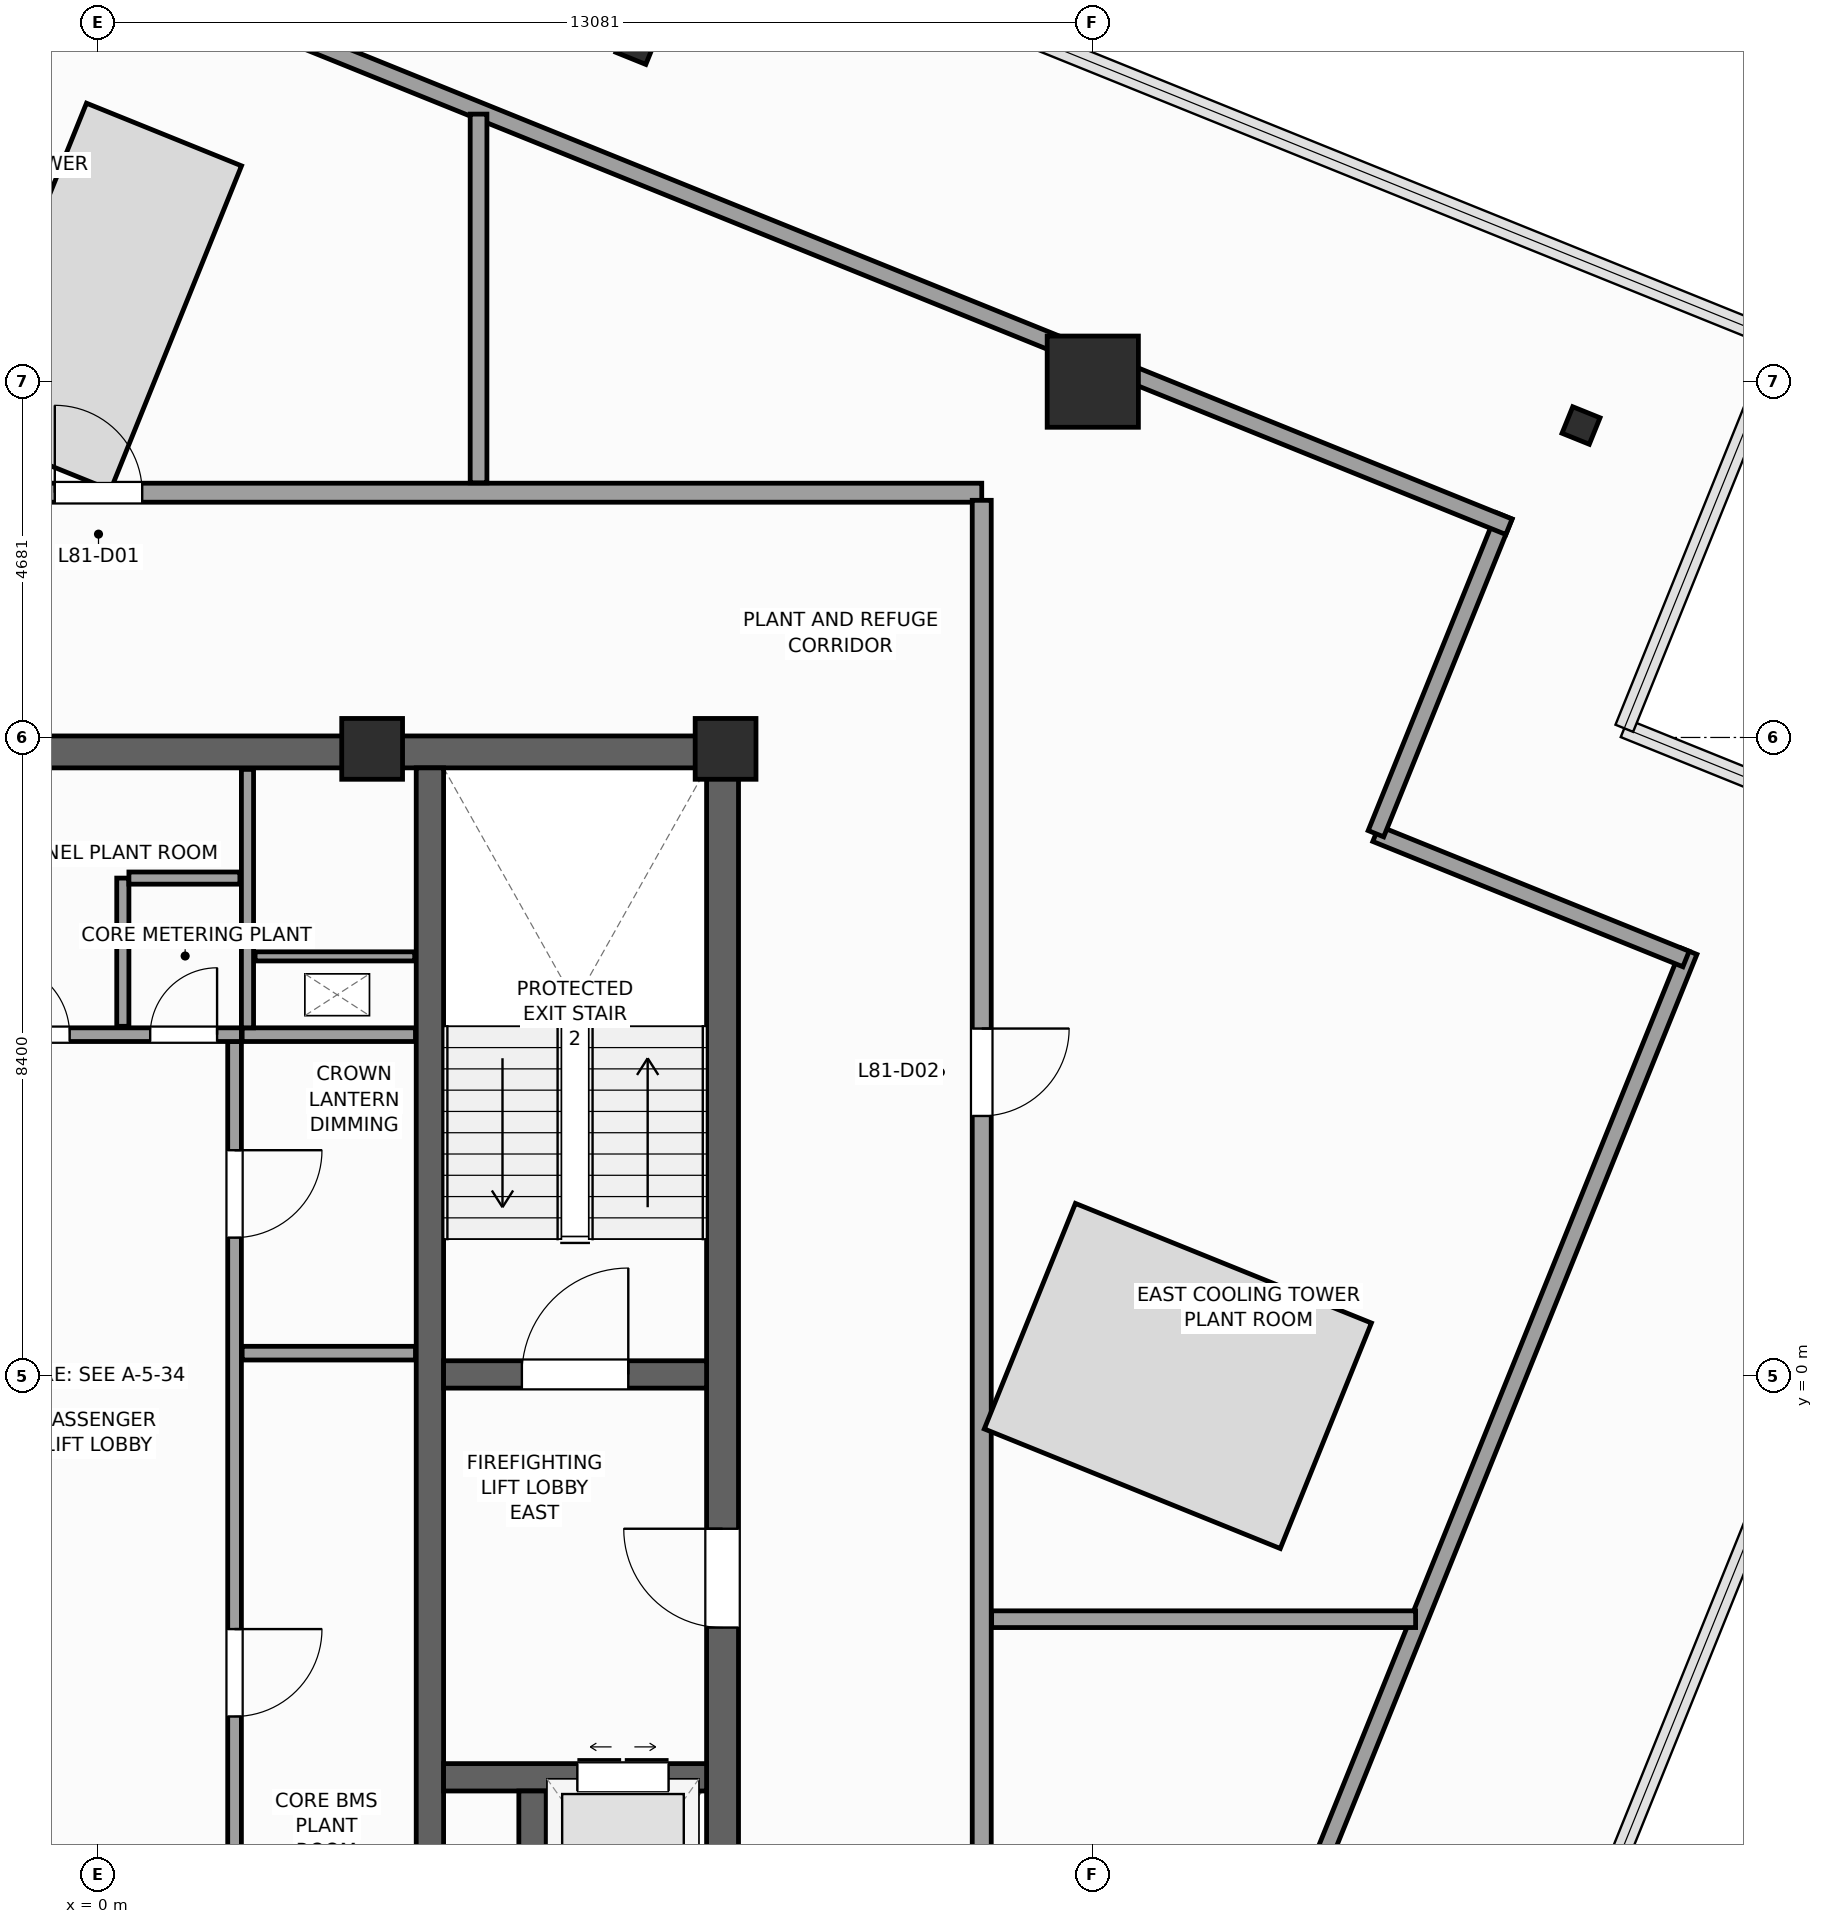
"""IFC4 building model, lengths in metres.
Left out: names, types, materials, properties, quantities, classifications, styles, units other than length and angle.
Written with IfcOpenShell. Run it as: python <this file> out.ifc"""

import sys

from ifc_helpers import new_model, si_unit, direction, frame, frame_2d, origin, origin_2d, place, context, subcontext, project, spatial, rectangle, i_section, extrude, source, transform, mapped, element, fill, save


model = new_model("IFC4")
c1 = context("Model", 3, precision=1e-05, world=origin(), true_north=direction((0.0, 1.0)))
c2 = subcontext(c1, "Body", "Model", "MODEL_VIEW")
j1 = project(units=[si_unit("LENGTHUNIT", "METRE"), si_unit("PLANEANGLEUNIT", "RADIAN")], contexts=[c1])
p1 = place(None, origin())
s1 = spatial("IfcSite", under=j1, at=p1, CompositionType="ELEMENT")
p2 = place(p1, origin())
s2 = spatial("IfcBuilding", under=s1, at=p2, CompositionType="ELEMENT")
p3 = place(p2, frame((0.0, 0.0, 329.6)))
s3 = spatial("IfcBuildingStorey", under=s2, at=p3, CompositionType="ELEMENT", Elevation=329.6)
p4 = place(p3, frame((-8.42, 8.21, 0.0), z_axis=(0.0, 0.0, 1.0), x_axis=(1.0, 0.0, 0.0)))
e1 = element("IfcWall", 1, at=p4, inside=s3, PredefinedType="SHEAR", context=c2, shape_type="SweptSolid", body=[
    extrude(rectangle(XDim=16.84, YDim=0.42, at=frame_2d((8.42, 0.0))), origin(), (0.0, 0.0, 1.0), 4.0),
])
p5 = place(p3, frame((8.21, -8.0, 0.0), z_axis=(0.0, 0.0, 1.0), x_axis=(0.0, 1.0, 0.0)))
e2 = element("IfcWall", 2, at=p5, inside=s3, PredefinedType="SHEAR", context=c2, shape_type="SweptSolid", body=[
    extrude(rectangle(XDim=16.0, YDim=0.42, at=frame_2d((8.0, 0.0))), origin(), (0.0, 0.0, 1.0), 4.0),
])
p6 = place(p5, frame((4.69, 0.0, 0.0)))
e3 = element("IfcOpeningElement", 3, at=p6, cuts=e2, PredefinedType="OPENING", context=c2, shape_type="SweptSolid", body=[
    extrude(rectangle(XDim=1.3, YDim=2.2, at=frame_2d((0.65, 1.1))), frame((0.0, 0.22, 0.0), z_axis=(0.0, -1.0, 0.0), x_axis=(1.0, 0.0, 0.0)), (0.0, 0.0, 1.0), 0.44),
])
p7 = place(p3, frame((4.36, -8.0, 0.0), z_axis=(0.0, 0.0, 1.0), x_axis=(0.0, 1.0, 0.0)))
e4 = element("IfcWall", 4, at=p7, inside=s3, PredefinedType="SHEAR", context=c2, shape_type="SweptSolid", body=[
    extrude(rectangle(XDim=16.0, YDim=0.36, at=frame_2d((8.0, 0.0))), origin(), (0.0, 0.0, 1.0), 4.0),
])
p8 = place(p3, frame((4.54, 0.02, 0.0), z_axis=(0.0, 0.0, 1.0), x_axis=(1.0, 0.0, 0.0)))
e5 = element("IfcWall", 5, at=p8, inside=s3, PredefinedType="SHEAR", context=c2, shape_type="SweptSolid", body=[
    extrude(rectangle(XDim=3.46, YDim=0.36, at=frame_2d((1.73, 0.0))), origin(), (0.0, 0.0, 1.0), 4.0),
])
p9 = place(p8, frame((1.03, 0.0, 0.0)))
e6 = element("IfcOpeningElement", 6, at=p9, cuts=e5, PredefinedType="OPENING", context=c2, shape_type="SweptSolid", body=[
    extrude(rectangle(XDim=1.4, YDim=2.2, at=frame_2d((0.7, 1.1))), frame((0.0, 0.19, 0.0), z_axis=(0.0, -1.0, 0.0), x_axis=(1.0, 0.0, 0.0)), (0.0, 0.0, 1.0), 0.38),
])
p10 = place(p3, frame((4.54, -5.28, 0.0), z_axis=(0.0, 0.0, 1.0), x_axis=(1.0, 0.0, 0.0)))
e7 = element("IfcWall", 7, at=p10, inside=s3, PredefinedType="SHEAR", context=c2, shape_type="SweptSolid", body=[
    extrude(rectangle(XDim=3.46, YDim=0.36, at=frame_2d((1.73, 0.0))), origin(), (0.0, 0.0, 1.0), 4.0),
])
p11 = place(p10, frame((1.76, 0.0, 0.0)))
e8 = element("IfcOpeningElement", 8, at=p11, cuts=e7, PredefinedType="OPENING", context=c2, shape_type="SweptSolid", body=[
    extrude(rectangle(XDim=1.2, YDim=2.25, at=frame_2d((0.6, 1.125))), frame((0.0, 0.19, 0.0), z_axis=(0.0, -1.0, 0.0), x_axis=(1.0, 0.0, 0.0)), (0.0, 0.0, 1.0), 0.38),
])
p12 = place(p3, frame((5.71, -8.0, 0.0), z_axis=(0.0, 0.0, 1.0), x_axis=(0.0, 1.0, 0.0)))
e9 = element("IfcWall", 9, at=p12, inside=s3, PredefinedType="SHEAR", context=c2, shape_type="SweptSolid", body=[
    extrude(rectangle(XDim=2.54, YDim=0.36, at=frame_2d((1.27, 0.0))), origin(), (0.0, 0.0, 1.0), 4.0),
])
m1 = source(origin(), c2, "Body", "SweptSolid", [
    extrude(rectangle(XDim=0.8, YDim=0.8, at=origin_2d()), origin(), (0.0, 0.0, 1.0), 4.0),
])
for number, where, z_axis, x_axis in (
    (10, (8.25, 8.25, 0.0), (0.0, 0.0, 1.0), (1.0, 0.0, 0.0)),
    (11, (3.6, 8.25, 0.0), (0.0, 0.0, 1.0), (1.0, 0.0, 0.0)),
):
    element("IfcColumn", number, at=place(p3, frame(where, z_axis=z_axis, x_axis=x_axis)), inside=s3, PredefinedType="PILASTER", context=c2, shape_type="MappedRepresentation", body=[
        mapped(m1, transform((0.0, 0.0, 0.0), scale=1.0)),
    ])
m2 = source(origin(), c2, "Body", "SweptSolid", [
    extrude(rectangle(XDim=1.2, YDim=1.2, at=origin_2d()), origin(), (0.0, 0.0, 1.0), 4.0),
])
p13 = place(p3, frame((13.081, 13.081, 0.0), z_axis=(0.0, 0.0, 1.0), x_axis=(1.0, 0.0, 0.0)))
e12 = element("IfcColumn", 12, at=p13, inside=s3, PredefinedType="COLUMN", context=c2, shape_type="MappedRepresentation", body=[
    mapped(m2, transform((0.0, 0.0, 0.0), scale=1.0)),
])
m3 = source(origin(), c2, "Body", "SweptSolid", [
    extrude(i_section(OverallWidth=0.376, OverallDepth=0.387, WebThickness=0.02, FlangeThickness=0.032, FilletRadius=0.015, at=origin_2d()), origin(), (0.0, 0.0, 1.0), 4.0),
])
p14 = place(p3, frame((19.504, 12.504, 0.0), z_axis=(0.0, 0.0, 1.0), x_axis=(0.374606593416, 0.927183854567, 0.0)))
e13 = element("IfcColumn", 13, at=p14, inside=s3, PredefinedType="COLUMN", context=c2, shape_type="MappedRepresentation", body=[
    mapped(m3, transform((0.0, 0.0, 0.0), scale=1.0)),
])
m4 = source(origin(), c2, "Body", "SweptSolid", [
    extrude(i_section(OverallWidth=0.409, OverallDepth=0.425, WebThickness=0.024, FlangeThickness=0.039, FilletRadius=0.015, at=origin_2d()), origin(), (0.0, 0.0, 1.0), 4.0),
])
p15 = place(p3, frame((7.08, 17.524, 0.0), z_axis=(0.0, 0.0, 1.0), x_axis=(0.374606593416, 0.927183854567, 0.0)))
e14 = element("IfcColumn", 14, at=p15, inside=s3, PredefinedType="COLUMN", context=c2, shape_type="MappedRepresentation", body=[
    mapped(m4, transform((0.0, 0.0, 0.0), scale=1.0)),
])
p16 = place(p3, frame((1.79, -7.98, 0.0), z_axis=(0.0, 0.0, 1.0), x_axis=(0.0, 1.0, 0.0)))
e15 = element("IfcWall", 15, at=p16, inside=s3, PredefinedType="PARTITIONING", context=c2, shape_type="SweptSolid", body=[
    extrude(rectangle(XDim=12.38, YDim=0.18, at=frame_2d((6.19, 0.0))), origin(), (0.0, 0.0, 1.0), 3.7),
])
p17 = place(p16, frame((3.5, 0.0, 0.0)))
e16 = element("IfcOpeningElement", 16, at=p17, cuts=e15, PredefinedType="OPENING", context=c2, shape_type="SweptSolid", body=[
    extrude(rectangle(XDim=1.15, YDim=2.25, at=frame_2d((0.575, 1.125))), frame((0.0, 0.1, 0.0), z_axis=(0.0, -1.0, 0.0), x_axis=(1.0, 0.0, 0.0)), (0.0, 0.0, 1.0), 0.2),
])
p18 = place(p16, frame((9.8, 0.0, 0.0)))
e17 = element("IfcOpeningElement", 17, at=p18, cuts=e15, PredefinedType="OPENING", context=c2, shape_type="SweptSolid", body=[
    extrude(rectangle(XDim=1.15, YDim=2.25, at=frame_2d((0.575, 1.125))), frame((0.0, 0.1, 0.0), z_axis=(0.0, -1.0, 0.0), x_axis=(1.0, 0.0, 0.0)), (0.0, 0.0, 1.0), 0.2),
])
p19 = place(p3, frame((-1.88, 4.49, 0.0), z_axis=(0.0, 0.0, 1.0), x_axis=(1.0, 0.0, 0.0)))
e18 = element("IfcWall", 18, at=p19, inside=s3, PredefinedType="PARTITIONING", context=c2, shape_type="SweptSolid", body=[
    extrude(rectangle(XDim=3.76, YDim=0.18, at=frame_2d((1.88, 0.0))), origin(), (0.0, 0.0, 1.0), 3.7),
])
p20 = place(p19, frame((0.55, 0.0, 0.0)))
e19 = element("IfcOpeningElement", 19, at=p20, cuts=e18, PredefinedType="OPENING", context=c2, shape_type="SweptSolid", body=[
    extrude(rectangle(XDim=0.95, YDim=2.1, at=frame_2d((0.475, 1.05))), frame((0.0, 0.1, 0.0), z_axis=(0.0, -1.0, 0.0), x_axis=(1.0, 0.0, 0.0)), (0.0, 0.0, 1.0), 0.2),
])
p21 = place(p19, frame((2.56, 0.0, 0.0)))
e20 = element("IfcOpeningElement", 20, at=p21, cuts=e18, PredefinedType="OPENING", context=c2, shape_type="SweptSolid", body=[
    extrude(rectangle(XDim=0.88, YDim=2.1, at=frame_2d((0.44, 1.05))), frame((0.0, 0.1, 0.0), z_axis=(0.0, -1.0, 0.0), x_axis=(1.0, 0.0, 0.0)), (0.0, 0.0, 1.0), 0.2),
])
for number, where, z_axis, x_axis in (
    (21, (1.89, 0.3, 0.0), (0.0, 0.0, 1.0), (1.0, 0.0, 0.0)),
    (22, (1.89, 4.49, 0.0), (0.0, 0.0, 1.0), (1.0, 0.0, 0.0)),
):
    element("IfcWall", number, at=place(p3, frame(where, z_axis=z_axis, x_axis=x_axis)), inside=s3, PredefinedType="PARTITIONING", context=c2, shape_type="SweptSolid", body=[
        extrude(rectangle(XDim=2.28, YDim=0.18, at=frame_2d((1.14, 0.0))), origin(), (0.0, 0.0, 1.0), 3.7),
    ])
p22 = place(p3, frame((1.96, 4.58, 0.0), z_axis=(0.0, 0.0, 1.0), x_axis=(0.0, 1.0, 0.0)))
e23 = element("IfcWall", 23, at=p22, inside=s3, PredefinedType="PARTITIONING", context=c2, shape_type="SweptSolid", body=[
    extrude(rectangle(XDim=3.4, YDim=0.16, at=frame_2d((1.7, 0.0))), origin(), (0.0, 0.0, 1.0), 3.7),
])
p23 = place(p3, frame((2.06, 5.52, 0.0), z_axis=(0.0, 0.0, 1.0), x_axis=(1.0, 0.0, 0.0)))
e24 = element("IfcWall", 24, at=p23, inside=s3, PredefinedType="PARTITIONING", context=c2, shape_type="SweptSolid", body=[
    extrude(rectangle(XDim=2.1, YDim=0.12, at=frame_2d((1.05, 0.0))), origin(), (0.0, 0.0, 1.0), 3.7),
])
p24 = place(p3, frame((0.32, 4.6, 0.0), z_axis=(0.0, 0.0, 1.0), x_axis=(0.0, 1.0, 0.0)))
e25 = element("IfcWall", 25, at=p24, inside=s3, PredefinedType="PARTITIONING", context=c2, shape_type="SweptSolid", body=[
    extrude(rectangle(XDim=1.95, YDim=0.16, at=frame_2d((0.975, 0.0))), origin(), (0.0, 0.0, 1.0), 3.7),
])
p25 = place(p3, frame((0.4, 6.55, 0.0), z_axis=(0.0, 0.0, 1.0), x_axis=(1.0, 0.0, 0.0)))
e26 = element("IfcWall", 26, at=p25, inside=s3, PredefinedType="PARTITIONING", context=c2, shape_type="SweptSolid", body=[
    extrude(rectangle(XDim=1.46, YDim=0.16, at=frame_2d((0.73, 0.0))), origin(), (0.0, 0.0, 1.0), 3.7),
])
p26 = place(p3, frame((11.172, -18.556, 0.0), z_axis=(0.0, 0.0, 1.0), x_axis=(0.374611707018, 0.927181788521, 0.0)))
e27 = element("IfcWall", 27, at=p26, inside=s3, PredefinedType="PARTITIONING", context=c2, shape_type="SweptSolid", body=[
    extrude(rectangle(XDim=26.04, YDim=0.22, at=frame_2d((13.02, 0.0))), origin(), (0.0, 0.0, 1.0), 3.05),
])
p27 = place(p3, frame((20.886, 5.486, 0.0), z_axis=(0.0, 0.0, 1.0), x_axis=(-0.927189216671, 0.374593321469, 0.0)))
e28 = element("IfcWall", 28, at=p27, inside=s3, PredefinedType="PARTITIONING", context=c2, shape_type="SweptSolid", body=[
    extrude(rectangle(XDim=4.4, YDim=0.22, at=frame_2d((2.2, 0.0))), origin(), (0.0, 0.0, 1.0), 3.7),
])
p28 = place(p3, frame((16.806, 7.134, 0.0), z_axis=(0.0, 0.0, 1.0), x_axis=(0.374599091925, 0.927186885331, 0.0)))
e29 = element("IfcWall", 29, at=p28, inside=s3, PredefinedType="PARTITIONING", context=c2, shape_type="SweptSolid", body=[
    extrude(rectangle(XDim=4.51, YDim=0.22, at=frame_2d((2.255, 0.0))), origin(), (0.0, 0.0, 1.0), 3.7),
])
p29 = place(p3, frame((18.556, 11.172, 0.0), z_axis=(0.0, 0.0, 1.0), x_axis=(-0.927181788521, 0.374611707018, 0.0)))
e30 = element("IfcWall", 30, at=p29, inside=s3, PredefinedType="PARTITIONING", context=c2, shape_type="SweptSolid", body=[
    extrude(rectangle(XDim=26.04, YDim=0.22, at=frame_2d((13.02, 0.0))), origin(), (0.0, 0.0, 1.0), 3.05),
])
p30 = place(p3, frame((-10.32, 11.62, 0.0), z_axis=(0.0, 0.0, 1.0), x_axis=(1.0, 0.0, 0.0)))
e31 = element("IfcWall", 31, at=p30, inside=s3, PredefinedType="PARTITIONING", context=c2, shape_type="SweptSolid", body=[
    extrude(rectangle(XDim=21.94, YDim=0.25, at=frame_2d((10.97, 0.0))), origin(), (0.0, 0.0, 1.0), 3.7),
])
p31 = place(p30, frame((9.745, 0.0, 0.0)))
e32 = element("IfcOpeningElement", 32, at=p31, cuts=e31, PredefinedType="OPENING", context=c2, shape_type="SweptSolid", body=[
    extrude(rectangle(XDim=1.15, YDim=2.25, at=frame_2d((0.575, 1.125))), frame((0.0, 0.135, 0.0), z_axis=(0.0, -1.0, 0.0), x_axis=(1.0, 0.0, 0.0)), (0.0, 0.0, 1.0), 0.27),
])
p32 = place(p3, frame((11.62, -10.22, 0.0), z_axis=(0.0, 0.0, 1.0), x_axis=(0.0, 1.0, 0.0)))
e33 = element("IfcWall", 33, at=p32, inside=s3, PredefinedType="PARTITIONING", context=c2, shape_type="SweptSolid", body=[
    extrude(rectangle(XDim=21.74, YDim=0.25, at=frame_2d((10.87, 0.0))), origin(), (0.0, 0.0, 1.0), 3.7),
])
p33 = place(p32, frame((13.641, 0.0, 0.0)))
e34 = element("IfcOpeningElement", 34, at=p33, cuts=e33, PredefinedType="OPENING", context=c2, shape_type="SweptSolid", body=[
    extrude(rectangle(XDim=1.15, YDim=2.25, at=frame_2d((0.575, 1.125))), frame((0.0, 0.135, 0.0), z_axis=(0.0, -1.0, 0.0), x_axis=(1.0, 0.0, 0.0)), (0.0, 0.0, 1.0), 0.27),
])
p34 = place(p3, frame((5.0, 11.75, 0.0), z_axis=(0.0, 0.0, 1.0), x_axis=(0.0, 1.0, 0.0)))
e35 = element("IfcWall", 35, at=p34, inside=s3, PredefinedType="PARTITIONING", context=c2, shape_type="SweptSolid", body=[
    extrude(rectangle(XDim=4.851, YDim=0.22, at=frame_2d((2.425, 0.0))), origin(), (0.0, 0.0, 1.0), 3.7),
])
p35 = place(p3, frame((11.75, -3.2, 0.0), z_axis=(0.0, 0.0, 1.0), x_axis=(1.0, 0.0, 0.0)))
e36 = element("IfcWall", 36, at=p35, inside=s3, PredefinedType="PARTITIONING", context=c2, shape_type="SweptSolid", body=[
    extrude(rectangle(XDim=5.578, YDim=0.22, at=frame_2d((2.789, 0.0))), origin(), (0.0, 0.0, 1.0), 3.7),
])
m5 = source(origin(), c2, "Body", "SweptSolid", [
    extrude(rectangle(XDim=1.4, YDim=2.2, at=frame_2d((0.7, 1.1))), frame((0.0, 0.025, 0.0), z_axis=(0.0, -1.0, 0.0), x_axis=(1.0, 0.0, 0.0)), (0.0, 0.0, 1.0), 0.05),
])
p36 = place(p9, origin())
e37 = element("IfcDoor", 37, at=p36, inside=s3, OperationType="SINGLE_SWING_RIGHT", PredefinedType="DOOR", context=c2, shape_type="MappedRepresentation", body=[
    mapped(m5, transform((0.0, 0.0, 0.0), scale=1.0)),
])
fill(e6, e37)
m6 = source(origin(), c2, "Body", "SweptSolid", [
    extrude(rectangle(XDim=1.3, YDim=2.2, at=frame_2d((0.65, 1.1))), frame((0.0, 0.025, 0.0), z_axis=(0.0, -1.0, 0.0), x_axis=(1.0, 0.0, 0.0)), (0.0, 0.0, 1.0), 0.05),
])
p37 = place(p6, origin())
e38 = element("IfcDoor", 38, at=p37, inside=s3, OperationType="SINGLE_SWING_RIGHT", PredefinedType="DOOR", context=c2, shape_type="MappedRepresentation", body=[
    mapped(m6, transform((0.0, 0.0, 0.0), scale=1.0)),
])
fill(e3, e38)
m7 = source(origin(), c2, "Body", "SweptSolid", [
    extrude(rectangle(XDim=1.2, YDim=2.25, at=frame_2d((0.6, 1.125))), frame((0.0, 0.025, 0.0), z_axis=(0.0, -1.0, 0.0), x_axis=(1.0, 0.0, 0.0)), (0.0, 0.0, 1.0), 0.05),
])
p38 = place(p11, origin())
e39 = element("IfcDoor", 39, at=p38, inside=s3, OperationType="DOUBLE_DOOR_SLIDING", PredefinedType="DOOR", context=c2, shape_type="MappedRepresentation", body=[
    mapped(m7, transform((0.0, 0.0, 0.0), scale=1.0)),
])
fill(e8, e39)
m8 = source(origin(), c2, "Body", "SweptSolid", [
    extrude(rectangle(XDim=1.15, YDim=2.25, at=frame_2d((0.575, 1.125))), frame((0.0, 0.025, 0.0), z_axis=(0.0, -1.0, 0.0), x_axis=(1.0, 0.0, 0.0)), (0.0, 0.0, 1.0), 0.05),
])
p39 = place(p17, frame((1.15, 0.0, 0.0), z_axis=(0.0, 0.0, 1.0), x_axis=(-1.0, 0.0, 0.0)))
e40 = element("IfcDoor", 40, at=p39, inside=s3, OperationType="SINGLE_SWING_RIGHT", PredefinedType="DOOR", context=c2, shape_type="MappedRepresentation", body=[
    mapped(m8, transform((0.0, 0.0, 0.0), scale=1.0)),
])
fill(e16, e40)
p40 = place(p18, frame((1.15, 0.0, 0.0), z_axis=(0.0, 0.0, 1.0), x_axis=(-1.0, 0.0, 0.0)))
e41 = element("IfcDoor", 41, at=p40, inside=s3, OperationType="SINGLE_SWING_RIGHT", PredefinedType="DOOR", context=c2, shape_type="MappedRepresentation", body=[
    mapped(m8, transform((0.0, 0.0, 0.0), scale=1.0)),
])
fill(e17, e41)
m9 = source(origin(), c2, "Body", "SweptSolid", [
    extrude(rectangle(XDim=0.95, YDim=2.1, at=frame_2d((0.475, 1.05))), frame((0.0, 0.025, 0.0), z_axis=(0.0, -1.0, 0.0), x_axis=(1.0, 0.0, 0.0)), (0.0, 0.0, 1.0), 0.05),
])
p41 = place(p20, origin())
e42 = element("IfcDoor", 42, at=p41, inside=s3, OperationType="SINGLE_SWING_LEFT", PredefinedType="DOOR", context=c2, shape_type="MappedRepresentation", body=[
    mapped(m9, transform((0.0, 0.0, 0.0), scale=1.0)),
])
fill(e19, e42)
m10 = source(origin(), c2, "Body", "SweptSolid", [
    extrude(rectangle(XDim=0.88, YDim=2.1, at=frame_2d((0.44, 1.05))), frame((0.0, 0.025, 0.0), z_axis=(0.0, -1.0, 0.0), x_axis=(1.0, 0.0, 0.0)), (0.0, 0.0, 1.0), 0.05),
])
p42 = place(p21, origin())
e43 = element("IfcDoor", 43, at=p42, inside=s3, OperationType="SINGLE_SWING_RIGHT", PredefinedType="DOOR", context=c2, shape_type="MappedRepresentation", body=[
    mapped(m10, transform((0.0, 0.0, 0.0), scale=1.0)),
])
fill(e20, e43)
p43 = place(p31, origin())
e44 = element("IfcDoor", 44, at=p43, inside=s3, OperationType="SINGLE_SWING_LEFT", PredefinedType="DOOR", context=c2, shape_type="MappedRepresentation", body=[
    mapped(m8, transform((0.0, 0.0, 0.0), scale=1.0)),
])
fill(e32, e44)
p44 = place(p33, frame((1.15, 0.0, 0.0), z_axis=(0.0, 0.0, 1.0), x_axis=(-1.0, 0.0, 0.0)))
e45 = element("IfcDoor", 45, at=p44, inside=s3, OperationType="SINGLE_SWING_RIGHT", PredefinedType="DOOR", context=c2, shape_type="MappedRepresentation", body=[
    mapped(m8, transform((0.0, 0.0, 0.0), scale=1.0)),
])
fill(e34, e45)
save(model, sys.argv[1])
